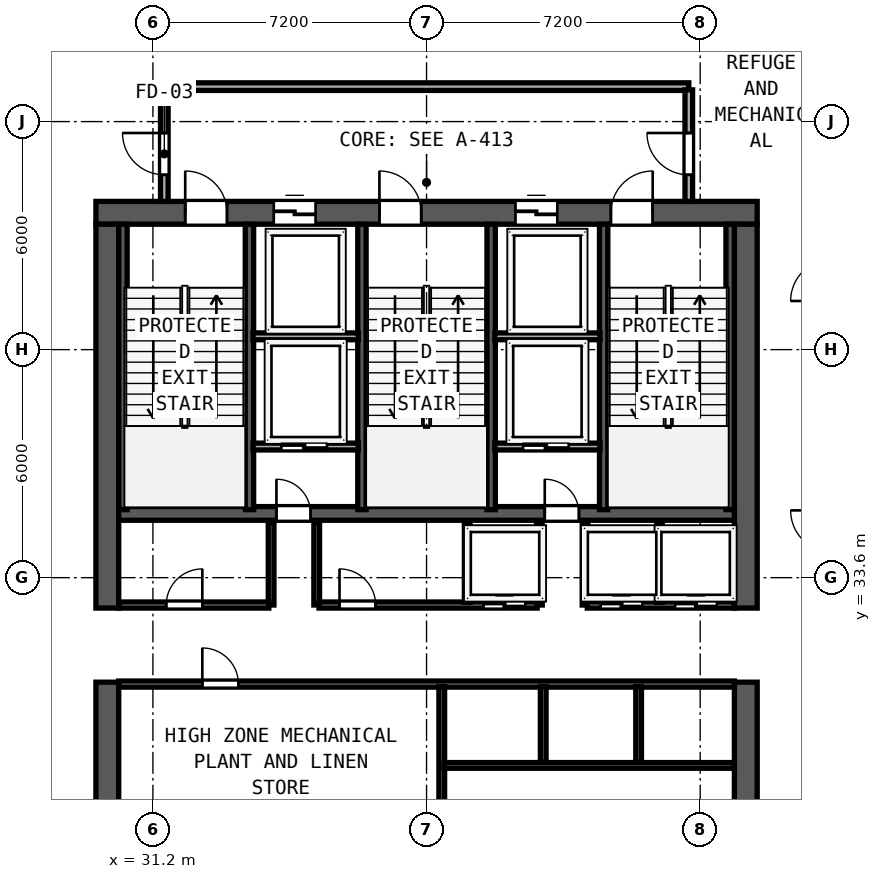
"""IFC4 building model, lengths in metres.
Left out: names, types, materials, properties, quantities, classifications, styles, units other than length and angle.
Written with IfcOpenShell. Run it as: python <this file> out.ifc"""

import sys

from ifc_helpers import new_model, si_unit, direction, frame, frame_2d, origin, place, context, subcontext, project, spatial, rectangle, extrude, element, fill, save


model = new_model("IFC4")
c1 = context("Model", 3, precision=1e-05, world=origin(), true_north=direction((0.0, 1.0)))
c2 = subcontext(c1, "Body", "Model", "MODEL_VIEW")
j1 = project(units=[si_unit("LENGTHUNIT", "METRE"), si_unit("PLANEANGLEUNIT", "RADIAN")], contexts=[c1])
p1 = place(None, origin())
s1 = spatial("IfcSite", under=j1, at=p1, CompositionType="ELEMENT")
p2 = place(p1, origin())
s2 = spatial("IfcBuilding", under=s1, at=p2, CompositionType="ELEMENT")
p3 = place(p2, frame((0.0, 0.0, 207.0)))
s3 = spatial("IfcBuildingStorey", under=s2, at=p3, CompositionType="ELEMENT", Elevation=207.0)
p4 = place(p3, frame((29.7, 43.2, 0.0), z_axis=(0.0, 0.0, 1.0), x_axis=(1.0, 0.0, 0.0)))
e1 = element("IfcWall", 1, at=p4, inside=s3, PredefinedType="SHEAR", context=c2, shape_type="SweptSolid", body=[
    extrude(rectangle(XDim=17.4, YDim=0.6, at=frame_2d((8.7, 0.0))), origin(), (0.0, 0.0, 1.0), 4.42),
])
p5 = place(p4, frame((2.35, 0.0, 0.0)))
e2 = element("IfcOpeningElement", 2, at=p5, cuts=e1, PredefinedType="OPENING", context=c2, shape_type="SweptSolid", body=[
    extrude(rectangle(XDim=1.1, YDim=2.15, at=frame_2d((0.55, 1.075))), frame((0.0, 0.31, 0.0), z_axis=(0.0, -1.0, 0.0), x_axis=(1.0, 0.0, 0.0)), (0.0, 0.0, 1.0), 0.62),
])
p6 = place(p4, frame((7.46, 0.0, 0.0)))
e3 = element("IfcOpeningElement", 3, at=p6, cuts=e1, PredefinedType="OPENING", context=c2, shape_type="SweptSolid", body=[
    extrude(rectangle(XDim=1.1, YDim=2.15, at=frame_2d((0.55, 1.075))), frame((0.0, 0.31, 0.0), z_axis=(0.0, -1.0, 0.0), x_axis=(1.0, 0.0, 0.0)), (0.0, 0.0, 1.0), 0.62),
])
p7 = place(p4, frame((13.55, 0.0, 0.0)))
e4 = element("IfcOpeningElement", 4, at=p7, cuts=e1, PredefinedType="OPENING", context=c2, shape_type="SweptSolid", body=[
    extrude(rectangle(XDim=1.1, YDim=2.15, at=frame_2d((0.55, 1.075))), frame((0.0, 0.31, 0.0), z_axis=(0.0, -1.0, 0.0), x_axis=(1.0, 0.0, 0.0)), (0.0, 0.0, 1.0), 0.62),
])
p8 = place(p4, frame((4.68, 0.0, 0.0)))
e5 = element("IfcOpeningElement", 5, at=p8, cuts=e1, PredefinedType="OPENING", context=c2, shape_type="SweptSolid", body=[
    extrude(rectangle(XDim=1.1, YDim=2.2, at=frame_2d((0.55, 1.1))), frame((0.0, 0.31, 0.0), z_axis=(0.0, -1.0, 0.0), x_axis=(1.0, 0.0, 0.0)), (0.0, 0.0, 1.0), 0.62),
])
p9 = place(p4, frame((11.04, 0.0, 0.0)))
e6 = element("IfcOpeningElement", 6, at=p9, cuts=e1, PredefinedType="OPENING", context=c2, shape_type="SweptSolid", body=[
    extrude(rectangle(XDim=1.1, YDim=2.2, at=frame_2d((0.55, 1.1))), frame((0.0, 0.31, 0.0), z_axis=(0.0, -1.0, 0.0), x_axis=(1.0, 0.0, 0.0)), (0.0, 0.0, 1.0), 0.62),
])
p10 = place(p3, frame((30.0, 26.7, 0.0), z_axis=(0.0, 0.0, 1.0), x_axis=(0.0, 1.0, 0.0)))
e7 = element("IfcWall", 7, at=p10, inside=s3, PredefinedType="SHEAR", context=c2, shape_type="SweptSolid", body=[
    extrude(rectangle(XDim=4.15, YDim=0.6, at=frame_2d((2.075, 0.0))), origin(), (0.0, 0.0, 1.0), 4.42),
])
p11 = place(p3, frame((30.0, 32.8, 0.0), z_axis=(0.0, 0.0, 1.0), x_axis=(0.0, 1.0, 0.0)))
e8 = element("IfcWall", 8, at=p11, inside=s3, PredefinedType="SHEAR", context=c2, shape_type="SweptSolid", body=[
    extrude(rectangle(XDim=10.1, YDim=0.6, at=frame_2d((5.05, 0.0))), origin(), (0.0, 0.0, 1.0), 4.42),
])
p12 = place(p3, frame((46.8, 26.7, 0.0), z_axis=(0.0, 0.0, 1.0), x_axis=(0.0, 1.0, 0.0)))
e9 = element("IfcWall", 9, at=p12, inside=s3, PredefinedType="SHEAR", context=c2, shape_type="SweptSolid", body=[
    extrude(rectangle(XDim=4.15, YDim=0.6, at=frame_2d((2.075, 0.0))), origin(), (0.0, 0.0, 1.0), 4.42),
])
p13 = place(p3, frame((46.8, 32.8, 0.0), z_axis=(0.0, 0.0, 1.0), x_axis=(0.0, 1.0, 0.0)))
e10 = element("IfcWall", 10, at=p13, inside=s3, PredefinedType="SHEAR", context=c2, shape_type="SweptSolid", body=[
    extrude(rectangle(XDim=10.1, YDim=0.6, at=frame_2d((5.05, 0.0))), origin(), (0.0, 0.0, 1.0), 4.42),
])
p14 = place(p3, frame((30.3, 35.29, 0.0), z_axis=(0.0, 0.0, 1.0), x_axis=(1.0, 0.0, 0.0)))
e11 = element("IfcWall", 11, at=p14, inside=s3, PredefinedType="SHEAR", context=c2, shape_type="SweptSolid", body=[
    extrude(rectangle(XDim=16.2, YDim=0.36, at=frame_2d((8.1, 0.0))), origin(), (0.0, 0.0, 1.0), 4.42),
])
p15 = place(p14, frame((5.05, 0.0, 0.0), z_axis=(0.0, 0.0, 1.0), x_axis=(-1.0, 0.0, 0.0)))
e12 = element("IfcOpeningElement", 12, at=p15, cuts=e11, PredefinedType="OPENING", context=c2, shape_type="SweptSolid", body=[
    extrude(rectangle(XDim=0.9, YDim=2.1, at=frame_2d((0.45, 1.05))), frame((0.0, 0.19, 0.0), z_axis=(0.0, -1.0, 0.0), x_axis=(1.0, 0.0, 0.0)), (0.0, 0.0, 1.0), 0.38),
])
p16 = place(p14, frame((12.11, 0.0, 0.0), z_axis=(0.0, 0.0, 1.0), x_axis=(-1.0, 0.0, 0.0)))
e13 = element("IfcOpeningElement", 13, at=p16, cuts=e11, PredefinedType="OPENING", context=c2, shape_type="SweptSolid", body=[
    extrude(rectangle(XDim=0.9, YDim=2.1, at=frame_2d((0.45, 1.05))), frame((0.0, 0.19, 0.0), z_axis=(0.0, -1.0, 0.0), x_axis=(1.0, 0.0, 0.0)), (0.0, 0.0, 1.0), 0.38),
])
for number, where, z_axis, x_axis in (
    (14, (30.412, 35.39, 0.0), (0.0, 0.0, 1.0), (0.0, 1.0, 0.0)),
    (15, (33.74, 35.39, 0.0), (0.0, 0.0, 1.0), (0.0, 1.0, 0.0)),
    (16, (36.7, 35.39, 0.0), (0.0, 0.0, 1.0), (0.0, 1.0, 0.0)),
    (17, (40.1, 35.39, 0.0), (0.0, 0.0, 1.0), (0.0, 1.0, 0.0)),
    (18, (43.06, 35.39, 0.0), (0.0, 0.0, 1.0), (0.0, 1.0, 0.0)),
    (19, (46.388, 35.39, 0.0), (0.0, 0.0, 1.0), (0.0, 1.0, 0.0)),
):
    element("IfcWall", number, at=place(p3, frame(where, z_axis=z_axis, x_axis=x_axis)), inside=s3, PredefinedType="SHEAR", context=c2, shape_type="SweptSolid", body=[
        extrude(rectangle(XDim=7.51, YDim=0.22, at=frame_2d((3.755, 0.0))), origin(), (0.0, 0.0, 1.0), 4.42),
    ])
p17 = place(p3, frame((31.5, 46.52, 0.0), z_axis=(0.0, 0.0, 1.0), x_axis=(1.0, 0.0, 0.0)))
e20 = element("IfcWall", 20, at=p17, inside=s3, PredefinedType="SOLIDWALL", context=c2, shape_type="SweptSolid", body=[
    extrude(rectangle(XDim=13.8, YDim=0.2, at=frame_2d((6.9, 0.0))), origin(), (0.0, 0.0, 1.0), 4.42),
])
p18 = place(p3, frame((31.5, 43.5, 0.0), z_axis=(0.0, 0.0, 1.0), x_axis=(0.0, 1.0, 0.0)))
e21 = element("IfcWall", 21, at=p18, inside=s3, PredefinedType="SOLIDWALL", context=c2, shape_type="SweptSolid", body=[
    extrude(rectangle(XDim=2.935, YDim=0.2, at=frame_2d((1.468, 0.0))), origin(), (0.0, 0.0, 1.0), 4.42),
])
p19 = place(p18, frame((1.8, 0.0, 0.0), z_axis=(0.0, 0.0, 1.0), x_axis=(-1.0, 0.0, 0.0)))
e22 = element("IfcOpeningElement", 22, at=p19, cuts=e21, PredefinedType="OPENING", context=c2, shape_type="SweptSolid", body=[
    extrude(rectangle(XDim=1.1, YDim=2.15, at=frame_2d((0.55, 1.075))), frame((0.0, 0.11, 0.0), z_axis=(0.0, -1.0, 0.0), x_axis=(1.0, 0.0, 0.0)), (0.0, 0.0, 1.0), 0.22),
])
p20 = place(p3, frame((45.3, 43.5, 0.0), z_axis=(0.0, 0.0, 1.0), x_axis=(0.0, 1.0, 0.0)))
e23 = element("IfcWall", 23, at=p20, inside=s3, PredefinedType="SOLIDWALL", context=c2, shape_type="SweptSolid", body=[
    extrude(rectangle(XDim=2.935, YDim=0.2, at=frame_2d((1.468, 0.0))), origin(), (0.0, 0.0, 1.0), 4.42),
])
p21 = place(p20, frame((0.7, 0.0, 0.0)))
e24 = element("IfcOpeningElement", 24, at=p21, cuts=e23, PredefinedType="OPENING", context=c2, shape_type="SweptSolid", body=[
    extrude(rectangle(XDim=1.1, YDim=2.15, at=frame_2d((0.55, 1.075))), frame((0.0, 0.11, 0.0), z_axis=(0.0, -1.0, 0.0), x_axis=(1.0, 0.0, 0.0)), (0.0, 0.0, 1.0), 0.22),
])
for number, where, z_axis, x_axis in (
    (25, (33.835, 39.95, 0.0), (0.0, 0.0, 1.0), (1.0, 0.0, 0.0)),
    (26, (40.195, 39.95, 0.0), (0.0, 0.0, 1.0), (1.0, 0.0, 0.0)),
):
    element("IfcWall", number, at=place(p3, frame(where, z_axis=z_axis, x_axis=x_axis)), inside=s3, PredefinedType="SOLIDWALL", context=c2, shape_type="SweptSolid", body=[
        extrude(rectangle(XDim=2.77, YDim=0.18, at=frame_2d((1.385, 0.0))), origin(), (0.0, 0.0, 1.0), 4.42),
    ])
p22 = place(p3, frame((33.835, 37.05, 0.0), z_axis=(0.0, 0.0, 1.0), x_axis=(1.0, 0.0, 0.0)))
e27 = element("IfcWall", 27, at=p22, inside=s3, PredefinedType="SOLIDWALL", context=c2, shape_type="SweptSolid", body=[
    extrude(rectangle(XDim=2.77, YDim=0.18, at=frame_2d((1.385, 0.0))), origin(), (0.0, 0.0, 1.0), 4.42),
])
p23 = place(p22, frame((1.945, 0.0, 0.0), z_axis=(0.0, 0.0, 1.0), x_axis=(-1.0, 0.0, 0.0)))
e28 = element("IfcOpeningElement", 28, at=p23, cuts=e27, PredefinedType="OPENING", context=c2, shape_type="SweptSolid", body=[
    extrude(rectangle(XDim=1.2, YDim=2.2, at=frame_2d((0.6, 1.1))), frame((0.0, 0.1, 0.0), z_axis=(0.0, -1.0, 0.0), x_axis=(1.0, 0.0, 0.0)), (0.0, 0.0, 1.0), 0.2),
])
for number, where, z_axis, x_axis in (
    (29, (34.31, 32.88, 0.0), (0.0, 0.0, 1.0), (0.0, 1.0, 0.0)),
    (30, (35.51, 32.88, 0.0), (0.0, 0.0, 1.0), (0.0, 1.0, 0.0)),
):
    element("IfcWall", number, at=place(p3, frame(where, z_axis=z_axis, x_axis=x_axis)), inside=s3, PredefinedType="SOLIDWALL", context=c2, shape_type="SweptSolid", body=[
        extrude(rectangle(XDim=2.17, YDim=0.15, at=frame_2d((1.085, 0.0))), origin(), (0.0, 0.0, 1.0), 4.42),
    ])
p24 = place(p3, frame((40.195, 37.05, 0.0), z_axis=(0.0, 0.0, 1.0), x_axis=(1.0, 0.0, 0.0)))
e31 = element("IfcWall", 31, at=p24, inside=s3, PredefinedType="SOLIDWALL", context=c2, shape_type="SweptSolid", body=[
    extrude(rectangle(XDim=2.77, YDim=0.18, at=frame_2d((1.385, 0.0))), origin(), (0.0, 0.0, 1.0), 4.42),
])
p25 = place(p24, frame((1.945, 0.0, 0.0), z_axis=(0.0, 0.0, 1.0), x_axis=(-1.0, 0.0, 0.0)))
e32 = element("IfcOpeningElement", 32, at=p25, cuts=e31, PredefinedType="OPENING", context=c2, shape_type="SweptSolid", body=[
    extrude(rectangle(XDim=1.2, YDim=2.2, at=frame_2d((0.6, 1.1))), frame((0.0, 0.1, 0.0), z_axis=(0.0, -1.0, 0.0), x_axis=(1.0, 0.0, 0.0)), (0.0, 0.0, 1.0), 0.2),
])
for number, where, z_axis, x_axis in (
    (33, (41.37, 32.88, 0.0), (0.0, 0.0, 1.0), (0.0, 1.0, 0.0)),
    (34, (42.57, 32.88, 0.0), (0.0, 0.0, 1.0), (0.0, 1.0, 0.0)),
):
    element("IfcWall", number, at=place(p3, frame(where, z_axis=z_axis, x_axis=x_axis)), inside=s3, PredefinedType="SOLIDWALL", context=c2, shape_type="SweptSolid", body=[
        extrude(rectangle(XDim=2.17, YDim=0.15, at=frame_2d((1.085, 0.0))), origin(), (0.0, 0.0, 1.0), 4.42),
    ])
p26 = place(p3, frame((30.3, 32.88, 0.0), z_axis=(0.0, 0.0, 1.0), x_axis=(1.0, 0.0, 0.0)))
e35 = element("IfcWall", 35, at=p26, inside=s3, PredefinedType="SOLIDWALL", context=c2, shape_type="SweptSolid", body=[
    extrude(rectangle(XDim=3.95, YDim=0.16, at=frame_2d((1.975, 0.0))), origin(), (0.0, 0.0, 1.0), 4.42),
])
p27 = place(p26, frame((2.2, 0.0, 0.0), z_axis=(0.0, 0.0, 1.0), x_axis=(-1.0, 0.0, 0.0)))
e36 = element("IfcOpeningElement", 36, at=p27, cuts=e35, PredefinedType="OPENING", context=c2, shape_type="SweptSolid", body=[
    extrude(rectangle(XDim=0.95, YDim=2.12, at=frame_2d((0.475, 1.06))), frame((0.0, 0.09, 0.0), z_axis=(0.0, -1.0, 0.0), x_axis=(1.0, 0.0, 0.0)), (0.0, 0.0, 1.0), 0.18),
])
p28 = place(p3, frame((35.57, 32.88, 0.0), z_axis=(0.0, 0.0, 1.0), x_axis=(1.0, 0.0, 0.0)))
e37 = element("IfcWall", 37, at=p28, inside=s3, PredefinedType="SOLIDWALL", context=c2, shape_type="SweptSolid", body=[
    extrude(rectangle(XDim=5.74, YDim=0.16, at=frame_2d((2.87, 0.0))), origin(), (0.0, 0.0, 1.0), 4.42),
])
p29 = place(p28, frame((1.49, 0.0, 0.0), z_axis=(0.0, 0.0, 1.0), x_axis=(-1.0, 0.0, 0.0)))
e38 = element("IfcOpeningElement", 38, at=p29, cuts=e37, PredefinedType="OPENING", context=c2, shape_type="SweptSolid", body=[
    extrude(rectangle(XDim=0.95, YDim=2.12, at=frame_2d((0.475, 1.06))), frame((0.0, 0.09, 0.0), z_axis=(0.0, -1.0, 0.0), x_axis=(1.0, 0.0, 0.0)), (0.0, 0.0, 1.0), 0.18),
])
p30 = place(p28, frame((5.43, 0.0, 0.0), z_axis=(0.0, 0.0, 1.0), x_axis=(-1.0, 0.0, 0.0)))
e39 = element("IfcOpeningElement", 39, at=p30, cuts=e37, PredefinedType="OPENING", context=c2, shape_type="SweptSolid", body=[
    extrude(rectangle(XDim=1.1, YDim=2.2, at=frame_2d((0.55, 1.1))), frame((0.0, 0.09, 0.0), z_axis=(0.0, -1.0, 0.0), x_axis=(1.0, 0.0, 0.0)), (0.0, 0.0, 1.0), 0.18),
])
p31 = place(p3, frame((42.63, 32.88, 0.0), z_axis=(0.0, 0.0, 1.0), x_axis=(1.0, 0.0, 0.0)))
e40 = element("IfcWall", 40, at=p31, inside=s3, PredefinedType="SOLIDWALL", context=c2, shape_type="SweptSolid", body=[
    extrude(rectangle(XDim=3.87, YDim=0.16, at=frame_2d((1.935, 0.0))), origin(), (0.0, 0.0, 1.0), 4.42),
])
p32 = place(p31, frame((1.45, 0.0, 0.0), z_axis=(0.0, 0.0, 1.0), x_axis=(-1.0, 0.0, 0.0)))
e41 = element("IfcOpeningElement", 41, at=p32, cuts=e40, PredefinedType="OPENING", context=c2, shape_type="SweptSolid", body=[
    extrude(rectangle(XDim=1.1, YDim=2.2, at=frame_2d((0.55, 1.1))), frame((0.0, 0.09, 0.0), z_axis=(0.0, -1.0, 0.0), x_axis=(1.0, 0.0, 0.0)), (0.0, 0.0, 1.0), 0.18),
])
p33 = place(p31, frame((3.41, 0.0, 0.0), z_axis=(0.0, 0.0, 1.0), x_axis=(-1.0, 0.0, 0.0)))
e42 = element("IfcOpeningElement", 42, at=p33, cuts=e40, PredefinedType="OPENING", context=c2, shape_type="SweptSolid", body=[
    extrude(rectangle(XDim=1.1, YDim=2.2, at=frame_2d((0.55, 1.1))), frame((0.0, 0.09, 0.0), z_axis=(0.0, -1.0, 0.0), x_axis=(1.0, 0.0, 0.0)), (0.0, 0.0, 1.0), 0.18),
])
for number, where, z_axis, x_axis in (
    (43, (39.47, 32.95, 0.0), (0.0, 0.0, 1.0), (0.0, 1.0, 0.0)),
    (44, (44.53, 32.95, 0.0), (0.0, 0.0, 1.0), (0.0, 1.0, 0.0)),
):
    element("IfcWall", number, at=place(p3, frame(where, z_axis=z_axis, x_axis=x_axis)), inside=s3, PredefinedType="SOLIDWALL", context=c2, shape_type="SweptSolid", body=[
        extrude(rectangle(XDim=2.05, YDim=0.15, at=frame_2d((1.025, 0.0))), origin(), (0.0, 0.0, 1.0), 4.42),
    ])
p34 = place(p3, frame((30.3, 30.8, 0.0), z_axis=(0.0, 0.0, 1.0), x_axis=(1.0, 0.0, 0.0)))
e45 = element("IfcWall", 45, at=p34, inside=s3, PredefinedType="SOLIDWALL", context=c2, shape_type="SweptSolid", body=[
    extrude(rectangle(XDim=16.2, YDim=0.16, at=frame_2d((8.1, 0.0))), origin(), (0.0, 0.0, 1.0), 4.42),
])
p35 = place(p34, frame((2.2, 0.0, 0.0)))
e46 = element("IfcOpeningElement", 46, at=p35, cuts=e45, PredefinedType="OPENING", context=c2, shape_type="SweptSolid", body=[
    extrude(rectangle(XDim=0.95, YDim=2.12, at=frame_2d((0.475, 1.06))), frame((0.0, 0.09, 0.0), z_axis=(0.0, -1.0, 0.0), x_axis=(1.0, 0.0, 0.0)), (0.0, 0.0, 1.0), 0.18),
])
p36 = place(p3, frame((38.8, 26.71, 0.0), z_axis=(0.0, 0.0, 1.0), x_axis=(0.0, 1.0, 0.0)))
e47 = element("IfcWall", 47, at=p36, inside=s3, PredefinedType="SOLIDWALL", context=c2, shape_type="SweptSolid", body=[
    extrude(rectangle(XDim=4.025, YDim=0.15, at=frame_2d((2.013, 0.0))), origin(), (0.0, 0.0, 1.0), 4.42),
])
p37 = place(p3, frame((38.86, 28.66, 0.0), z_axis=(0.0, 0.0, 1.0), x_axis=(1.0, 0.0, 0.0)))
e48 = element("IfcWall", 48, at=p37, inside=s3, PredefinedType="PARTITIONING", context=c2, shape_type="SweptSolid", body=[
    extrude(rectangle(XDim=7.64, YDim=0.15, at=frame_2d((3.82, 0.0))), origin(), (0.0, 0.0, 1.0), 4.42),
])
for number, where, z_axis, x_axis in (
    (49, (41.47, 28.75, 0.0), (0.0, 0.0, 1.0), (0.0, 1.0, 0.0)),
    (50, (43.98, 28.75, 0.0), (0.0, 0.0, 1.0), (0.0, 1.0, 0.0)),
):
    element("IfcWall", number, at=place(p3, frame(where, z_axis=z_axis, x_axis=x_axis)), inside=s3, PredefinedType="SOLIDWALL", context=c2, shape_type="SweptSolid", body=[
        extrude(rectangle(XDim=1.985, YDim=0.15, at=frame_2d((0.993, 0.0))), origin(), (0.0, 0.0, 1.0), 4.42),
    ])
p38 = place(p5, origin())
e51 = element("IfcDoor", 51, at=p38, inside=s3, OperationType="SINGLE_SWING_LEFT", PredefinedType="DOOR", context=c2, shape_type="SweptSolid", body=[
    extrude(rectangle(XDim=1.1, YDim=2.15, at=frame_2d((0.55, 1.075))), frame((0.0, 0.185, 0.0), z_axis=(0.0, -1.0, 0.0), x_axis=(1.0, 0.0, 0.0)), (0.0, 0.0, 1.0), 0.05),
])
fill(e2, e51)
p39 = place(p6, origin())
e52 = element("IfcDoor", 52, at=p39, inside=s3, OperationType="SINGLE_SWING_LEFT", PredefinedType="DOOR", context=c2, shape_type="SweptSolid", body=[
    extrude(rectangle(XDim=1.1, YDim=2.15, at=frame_2d((0.55, 1.075))), frame((0.0, 0.185, 0.0), z_axis=(0.0, -1.0, 0.0), x_axis=(1.0, 0.0, 0.0)), (0.0, 0.0, 1.0), 0.05),
])
fill(e3, e52)
p40 = place(p7, origin())
e53 = element("IfcDoor", 53, at=p40, inside=s3, OperationType="SINGLE_SWING_RIGHT", PredefinedType="DOOR", context=c2, shape_type="SweptSolid", body=[
    extrude(rectangle(XDim=1.1, YDim=2.15, at=frame_2d((0.55, 1.075))), frame((0.0, 0.185, 0.0), z_axis=(0.0, -1.0, 0.0), x_axis=(1.0, 0.0, 0.0)), (0.0, 0.0, 1.0), 0.05),
])
fill(e4, e53)
p41 = place(p19, origin())
e54 = element("IfcDoor", 54, at=p41, inside=s3, OperationType="SINGLE_SWING_LEFT", PredefinedType="DOOR", context=c2, shape_type="SweptSolid", body=[
    extrude(rectangle(XDim=1.1, YDim=2.15, at=frame_2d((0.55, 1.075))), frame((0.0, 0.025, 0.0), z_axis=(0.0, -1.0, 0.0), x_axis=(1.0, 0.0, 0.0)), (0.0, 0.0, 1.0), 0.05),
])
fill(e22, e54)
p42 = place(p21, origin())
e55 = element("IfcDoor", 55, at=p42, inside=s3, OperationType="SINGLE_SWING_RIGHT", PredefinedType="DOOR", context=c2, shape_type="SweptSolid", body=[
    extrude(rectangle(XDim=1.1, YDim=2.15, at=frame_2d((0.55, 1.075))), frame((0.0, 0.025, 0.0), z_axis=(0.0, -1.0, 0.0), x_axis=(1.0, 0.0, 0.0)), (0.0, 0.0, 1.0), 0.05),
])
fill(e24, e55)
p43 = place(p8, origin())
e56 = element("IfcDoor", 56, at=p43, inside=s3, OperationType="SLIDING_TO_LEFT", PredefinedType="DOOR", context=c2, shape_type="SweptSolid", body=[
    extrude(rectangle(XDim=1.1, YDim=2.2, at=frame_2d((0.55, 1.1))), frame((0.0, 0.185, 0.0), z_axis=(0.0, -1.0, 0.0), x_axis=(1.0, 0.0, 0.0)), (0.0, 0.0, 1.0), 0.05),
])
fill(e5, e56)
p44 = place(p9, origin())
e57 = element("IfcDoor", 57, at=p44, inside=s3, OperationType="SLIDING_TO_LEFT", PredefinedType="DOOR", context=c2, shape_type="SweptSolid", body=[
    extrude(rectangle(XDim=1.1, YDim=2.2, at=frame_2d((0.55, 1.1))), frame((0.0, 0.185, 0.0), z_axis=(0.0, -1.0, 0.0), x_axis=(1.0, 0.0, 0.0)), (0.0, 0.0, 1.0), 0.05),
])
fill(e6, e57)
p45 = place(p23, origin())
e58 = element("IfcDoor", 58, at=p45, inside=s3, OperationType="SLIDING_TO_RIGHT", PredefinedType="DOOR", context=c2, shape_type="SweptSolid", body=[
    extrude(rectangle(XDim=1.2, YDim=2.2, at=frame_2d((0.6, 1.1))), frame((0.0, 0.025, 0.0), z_axis=(0.0, -1.0, 0.0), x_axis=(1.0, 0.0, 0.0)), (0.0, 0.0, 1.0), 0.05),
])
fill(e28, e58)
p46 = place(p15, origin())
e59 = element("IfcDoor", 59, at=p46, inside=s3, OperationType="SINGLE_SWING_RIGHT", PredefinedType="DOOR", context=c2, shape_type="SweptSolid", body=[
    extrude(rectangle(XDim=0.9, YDim=2.1, at=frame_2d((0.45, 1.05))), frame((0.0, 0.025, 0.0), z_axis=(0.0, -1.0, 0.0), x_axis=(1.0, 0.0, 0.0)), (0.0, 0.0, 1.0), 0.05),
])
fill(e12, e59)
p47 = place(p25, origin())
e60 = element("IfcDoor", 60, at=p47, inside=s3, OperationType="SLIDING_TO_RIGHT", PredefinedType="DOOR", context=c2, shape_type="SweptSolid", body=[
    extrude(rectangle(XDim=1.2, YDim=2.2, at=frame_2d((0.6, 1.1))), frame((0.0, 0.025, 0.0), z_axis=(0.0, -1.0, 0.0), x_axis=(1.0, 0.0, 0.0)), (0.0, 0.0, 1.0), 0.05),
])
fill(e32, e60)
p48 = place(p16, origin())
e61 = element("IfcDoor", 61, at=p48, inside=s3, OperationType="SINGLE_SWING_RIGHT", PredefinedType="DOOR", context=c2, shape_type="SweptSolid", body=[
    extrude(rectangle(XDim=0.9, YDim=2.1, at=frame_2d((0.45, 1.05))), frame((0.0, 0.025, 0.0), z_axis=(0.0, -1.0, 0.0), x_axis=(1.0, 0.0, 0.0)), (0.0, 0.0, 1.0), 0.05),
])
fill(e13, e61)
p49 = place(p27, origin())
e62 = element("IfcDoor", 62, at=p49, inside=s3, OperationType="SINGLE_SWING_LEFT", PredefinedType="DOOR", context=c2, shape_type="SweptSolid", body=[
    extrude(rectangle(XDim=0.95, YDim=2.12, at=frame_2d((0.475, 1.06))), frame((0.0, 0.025, 0.0), z_axis=(0.0, -1.0, 0.0), x_axis=(1.0, 0.0, 0.0)), (0.0, 0.0, 1.0), 0.05),
])
fill(e36, e62)
p50 = place(p29, origin())
e63 = element("IfcDoor", 63, at=p50, inside=s3, OperationType="SINGLE_SWING_RIGHT", PredefinedType="DOOR", context=c2, shape_type="SweptSolid", body=[
    extrude(rectangle(XDim=0.95, YDim=2.12, at=frame_2d((0.475, 1.06))), frame((0.0, 0.025, 0.0), z_axis=(0.0, -1.0, 0.0), x_axis=(1.0, 0.0, 0.0)), (0.0, 0.0, 1.0), 0.05),
])
fill(e38, e63)
p51 = place(p30, origin())
e64 = element("IfcDoor", 64, at=p51, inside=s3, OperationType="SLIDING_TO_RIGHT", PredefinedType="DOOR", context=c2, shape_type="SweptSolid", body=[
    extrude(rectangle(XDim=1.1, YDim=2.2, at=frame_2d((0.55, 1.1))), frame((0.0, 0.025, 0.0), z_axis=(0.0, -1.0, 0.0), x_axis=(1.0, 0.0, 0.0)), (0.0, 0.0, 1.0), 0.05),
])
fill(e39, e64)
p52 = place(p32, origin())
e65 = element("IfcDoor", 65, at=p52, inside=s3, OperationType="SLIDING_TO_RIGHT", PredefinedType="DOOR", context=c2, shape_type="SweptSolid", body=[
    extrude(rectangle(XDim=1.1, YDim=2.2, at=frame_2d((0.55, 1.1))), frame((0.0, 0.025, 0.0), z_axis=(0.0, -1.0, 0.0), x_axis=(1.0, 0.0, 0.0)), (0.0, 0.0, 1.0), 0.05),
])
fill(e41, e65)
p53 = place(p33, origin())
e66 = element("IfcDoor", 66, at=p53, inside=s3, OperationType="SLIDING_TO_RIGHT", PredefinedType="DOOR", context=c2, shape_type="SweptSolid", body=[
    extrude(rectangle(XDim=1.1, YDim=2.2, at=frame_2d((0.55, 1.1))), frame((0.0, 0.025, 0.0), z_axis=(0.0, -1.0, 0.0), x_axis=(1.0, 0.0, 0.0)), (0.0, 0.0, 1.0), 0.05),
])
fill(e42, e66)
p54 = place(p35, origin())
e67 = element("IfcDoor", 67, at=p54, inside=s3, OperationType="SINGLE_SWING_LEFT", PredefinedType="DOOR", context=c2, shape_type="SweptSolid", body=[
    extrude(rectangle(XDim=0.95, YDim=2.12, at=frame_2d((0.475, 1.06))), frame((0.0, 0.025, 0.0), z_axis=(0.0, -1.0, 0.0), x_axis=(1.0, 0.0, 0.0)), (0.0, 0.0, 1.0), 0.05),
])
fill(e46, e67)
save(model, sys.argv[1])
